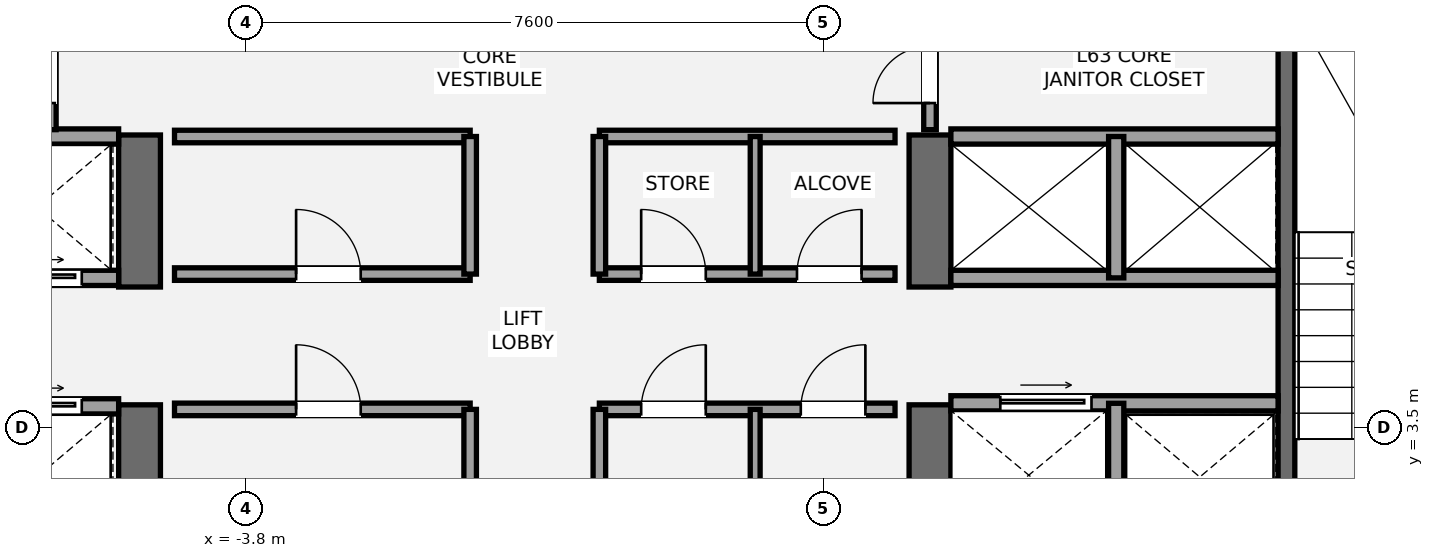
"""IFC4 building model, lengths in metres.
Left out: names, types, materials, properties, quantities, classifications, styles, units other than length and angle.
Written with IfcOpenShell. Run it as: python <this file> out.ifc"""

import sys

from ifc_helpers import new_model, si_unit, direction, frame, frame_2d, origin, place, context, subcontext, project, spatial, rectangle, extrude, element, fill, save


model = new_model("IFC4")
c1 = context("Model", 3, precision=1e-05, world=origin(), true_north=direction((0.0, 1.0)))
c2 = subcontext(c1, "Body", "Model", "MODEL_VIEW")
j1 = project(units=[si_unit("LENGTHUNIT", "METRE"), si_unit("PLANEANGLEUNIT", "RADIAN")], contexts=[c1])
p1 = place(None, origin())
s1 = spatial("IfcSite", under=j1, at=p1, CompositionType="ELEMENT")
p2 = place(p1, origin())
s2 = spatial("IfcBuilding", under=s1, at=p2, CompositionType="ELEMENT")
p3 = place(p2, frame((0.0, 0.0, 225.75)))
s3 = spatial("IfcBuildingStorey", under=s2, at=p3, CompositionType="ELEMENT", Elevation=225.75)
p4 = place(p3, frame((-5.2, 1.3, 0.0), z_axis=(0.0, 0.0, 1.0), x_axis=(0.0, 1.0, 0.0)))
e1 = element("IfcWall", 1, at=p4, inside=s3, PredefinedType="SHEAR", context=c2, shape_type="SweptSolid", body=[
    extrude(rectangle(XDim=2.5, YDim=0.55, at=frame_2d((1.25, 0.0))), origin(), (0.0, 0.0, 1.0), 3.15),
])
p5 = place(p3, frame((-5.2, 5.35, 0.0), z_axis=(0.0, 0.0, 1.0), x_axis=(0.0, 1.0, 0.0)))
e2 = element("IfcWall", 2, at=p5, inside=s3, PredefinedType="SHEAR", context=c2, shape_type="SweptSolid", body=[
    extrude(rectangle(XDim=2.0, YDim=0.55, at=frame_2d((1.0, 0.0))), origin(), (0.0, 0.0, 1.0), 3.15),
])
p6 = place(p3, frame((5.2, 1.3, 0.0), z_axis=(0.0, 0.0, 1.0), x_axis=(0.0, 1.0, 0.0)))
e3 = element("IfcWall", 3, at=p6, inside=s3, PredefinedType="SHEAR", context=c2, shape_type="SweptSolid", body=[
    extrude(rectangle(XDim=2.5, YDim=0.55, at=frame_2d((1.25, 0.0))), origin(), (0.0, 0.0, 1.0), 3.15),
])
p7 = place(p3, frame((5.2, 5.35, 0.0), z_axis=(0.0, 0.0, 1.0), x_axis=(0.0, 1.0, 0.0)))
e4 = element("IfcWall", 4, at=p7, inside=s3, PredefinedType="SHEAR", context=c2, shape_type="SweptSolid", body=[
    extrude(rectangle(XDim=2.0, YDim=0.55, at=frame_2d((1.0, 0.0))), origin(), (0.0, 0.0, 1.0), 3.15),
])
p8 = place(p3, frame((9.89, 1.85, 0.0), z_axis=(0.0, 0.0, 1.0), x_axis=(0.0, 1.0, 0.0)))
e5 = element("IfcWall", 5, at=p8, inside=s3, PredefinedType="SHEAR", context=c2, shape_type="SweptSolid", body=[
    extrude(rectangle(XDim=7.15, YDim=0.22, at=frame_2d((3.575, 0.0))), origin(), (0.0, 0.0, 1.0), 3.15),
])
p9 = place(p3, frame((-9.78, 3.78, 0.0), z_axis=(0.0, 0.0, 1.0), x_axis=(1.0, 0.0, 0.0)))
e6 = element("IfcWall", 6, at=p9, inside=s3, PredefinedType="SOLIDWALL", context=c2, shape_type="SweptSolid", body=[
    extrude(rectangle(XDim=4.305, YDim=0.2, at=frame_2d((2.152, 0.0))), origin(), (0.0, 0.0, 1.0), 2.97),
])
p10 = place(p9, frame((2.72, 0.0, 0.0)))
e7 = element("IfcOpeningElement", 7, at=p10, cuts=e6, PredefinedType="OPENING", context=c2, shape_type="SweptSolid", body=[
    extrude(rectangle(XDim=1.1, YDim=2.2, at=frame_2d((0.55, 1.1))), frame((0.0, 0.11, 0.0), z_axis=(0.0, -1.0, 0.0), x_axis=(1.0, 0.0, 0.0)), (0.0, 0.0, 1.0), 0.22),
])
p11 = place(p3, frame((-9.78, 5.47, 0.0), z_axis=(0.0, 0.0, 1.0), x_axis=(1.0, 0.0, 0.0)))
e8 = element("IfcWall", 8, at=p11, inside=s3, PredefinedType="SOLIDWALL", context=c2, shape_type="SweptSolid", body=[
    extrude(rectangle(XDim=4.305, YDim=0.2, at=frame_2d((2.152, 0.0))), origin(), (0.0, 0.0, 1.0), 2.97),
])
p12 = place(p11, frame((0.55, 0.0, 0.0)))
e9 = element("IfcOpeningElement", 9, at=p12, cuts=e8, PredefinedType="OPENING", context=c2, shape_type="SweptSolid", body=[
    extrude(rectangle(XDim=1.1, YDim=2.2, at=frame_2d((0.55, 1.1))), frame((0.0, 0.11, 0.0), z_axis=(0.0, -1.0, 0.0), x_axis=(1.0, 0.0, 0.0)), (0.0, 0.0, 1.0), 0.22),
])
p13 = place(p11, frame((2.72, 0.0, 0.0)))
e10 = element("IfcOpeningElement", 10, at=p13, cuts=e8, PredefinedType="OPENING", context=c2, shape_type="SweptSolid", body=[
    extrude(rectangle(XDim=1.1, YDim=2.2, at=frame_2d((0.55, 1.1))), frame((0.0, 0.11, 0.0), z_axis=(0.0, -1.0, 0.0), x_axis=(1.0, 0.0, 0.0)), (0.0, 0.0, 1.0), 0.22),
])
p14 = place(p3, frame((-9.78, 7.33, 0.0), z_axis=(0.0, 0.0, 1.0), x_axis=(1.0, 0.0, 0.0)))
e11 = element("IfcWall", 11, at=p14, inside=s3, PredefinedType="SOLIDWALL", context=c2, shape_type="SweptSolid", body=[
    extrude(rectangle(XDim=4.305, YDim=0.2, at=frame_2d((2.152, 0.0))), origin(), (0.0, 0.0, 1.0), 2.97),
])
p15 = place(p3, frame((5.475, 3.82, 0.0), z_axis=(0.0, 0.0, 1.0), x_axis=(1.0, 0.0, 0.0)))
e12 = element("IfcWall", 12, at=p15, inside=s3, PredefinedType="SOLIDWALL", context=c2, shape_type="SweptSolid", body=[
    extrude(rectangle(XDim=4.305, YDim=0.2, at=frame_2d((2.152, 0.0))), origin(), (0.0, 0.0, 1.0), 2.97),
])
p16 = place(p15, frame((0.65, 0.0, 0.0)))
e13 = element("IfcOpeningElement", 13, at=p16, cuts=e12, PredefinedType="OPENING", context=c2, shape_type="SweptSolid", body=[
    extrude(rectangle(XDim=1.2, YDim=2.2, at=frame_2d((0.6, 1.1))), frame((0.0, 0.11, 0.0), z_axis=(0.0, -1.0, 0.0), x_axis=(1.0, 0.0, 0.0)), (0.0, 0.0, 1.0), 0.22),
])
p17 = place(p3, frame((7.65, 1.85, 0.0), z_axis=(0.0, 0.0, 1.0), x_axis=(0.0, 1.0, 0.0)))
e14 = element("IfcWall", 14, at=p17, inside=s3, PredefinedType="SOLIDWALL", context=c2, shape_type="SweptSolid", body=[
    extrude(rectangle(XDim=1.97, YDim=0.2, at=frame_2d((0.985, 0.0))), origin(), (0.0, 0.0, 1.0), 2.97),
])
for number, where, z_axis, x_axis in (
    (15, (5.475, 5.47, 0.0), (0.0, 0.0, 1.0), (1.0, 0.0, 0.0)),
    (16, (5.475, 7.33, 0.0), (0.0, 0.0, 1.0), (1.0, 0.0, 0.0)),
):
    element("IfcWall", number, at=place(p3, frame(where, z_axis=z_axis, x_axis=x_axis)), inside=s3, PredefinedType="SOLIDWALL", context=c2, shape_type="SweptSolid", body=[
        extrude(rectangle(XDim=4.305, YDim=0.2, at=frame_2d((2.152, 0.0))), origin(), (0.0, 0.0, 1.0), 2.97),
    ])
p18 = place(p3, frame((7.65, 5.47, 0.0), z_axis=(0.0, 0.0, 1.0), x_axis=(0.0, 1.0, 0.0)))
e17 = element("IfcWall", 17, at=p18, inside=s3, PredefinedType="SOLIDWALL", context=c2, shape_type="SweptSolid", body=[
    extrude(rectangle(XDim=1.86, YDim=0.2, at=frame_2d((0.93, 0.0))), origin(), (0.0, 0.0, 1.0), 2.97),
])
p19 = place(p3, frame((-4.74, 3.74, 0.0), z_axis=(0.0, 0.0, 1.0), x_axis=(1.0, 0.0, 0.0)))
e18 = element("IfcWall", 18, at=p19, inside=s3, PredefinedType="PARTITIONING", context=c2, shape_type="SweptSolid", body=[
    extrude(rectangle(XDim=3.89, YDim=0.165, at=frame_2d((1.945, 0.0))), origin(), (0.0, 0.0, 1.0), 2.97),
])
p20 = place(p19, frame((1.6, 0.0, 0.0)))
e19 = element("IfcOpeningElement", 19, at=p20, cuts=e18, PredefinedType="OPENING", context=c2, shape_type="SweptSolid", body=[
    extrude(rectangle(XDim=0.85, YDim=2.1, at=frame_2d((0.425, 1.05))), frame((0.0, 0.093, 0.0), z_axis=(0.0, -1.0, 0.0), x_axis=(1.0, 0.0, 0.0)), (0.0, 0.0, 1.0), 0.185),
])
p21 = place(p3, frame((-0.85, 1.92, 0.0), z_axis=(0.0, 0.0, 1.0), x_axis=(0.0, 1.0, 0.0)))
e20 = element("IfcWall", 20, at=p21, inside=s3, PredefinedType="PARTITIONING", context=c2, shape_type="SweptSolid", body=[
    extrude(rectangle(XDim=1.82, YDim=0.165, at=frame_2d((0.91, 0.0))), origin(), (0.0, 0.0, 1.0), 2.97),
])
p22 = place(p3, frame((0.85, 3.74, 0.0), z_axis=(0.0, 0.0, 1.0), x_axis=(1.0, 0.0, 0.0)))
e21 = element("IfcWall", 21, at=p22, inside=s3, PredefinedType="PARTITIONING", context=c2, shape_type="SweptSolid", body=[
    extrude(rectangle(XDim=3.89, YDim=0.165, at=frame_2d((1.945, 0.0))), origin(), (0.0, 0.0, 1.0), 2.97),
])
p23 = place(p22, frame((0.55, 0.0, 0.0)))
e22 = element("IfcOpeningElement", 22, at=p23, cuts=e21, PredefinedType="OPENING", context=c2, shape_type="SweptSolid", body=[
    extrude(rectangle(XDim=0.85, YDim=2.1, at=frame_2d((0.425, 1.05))), frame((0.0, 0.093, 0.0), z_axis=(0.0, -1.0, 0.0), x_axis=(1.0, 0.0, 0.0)), (0.0, 0.0, 1.0), 0.185),
])
p24 = place(p22, frame((2.65, 0.0, 0.0)))
e23 = element("IfcOpeningElement", 23, at=p24, cuts=e21, PredefinedType="OPENING", context=c2, shape_type="SweptSolid", body=[
    extrude(rectangle(XDim=0.85, YDim=2.1, at=frame_2d((0.425, 1.05))), frame((0.0, 0.093, 0.0), z_axis=(0.0, -1.0, 0.0), x_axis=(1.0, 0.0, 0.0)), (0.0, 0.0, 1.0), 0.185),
])
p25 = place(p3, frame((0.85, 1.92, 0.0), z_axis=(0.0, 0.0, 1.0), x_axis=(0.0, 1.0, 0.0)))
e24 = element("IfcWall", 24, at=p25, inside=s3, PredefinedType="PARTITIONING", context=c2, shape_type="SweptSolid", body=[
    extrude(rectangle(XDim=1.82, YDim=0.165, at=frame_2d((0.91, 0.0))), origin(), (0.0, 0.0, 1.0), 2.97),
])
p26 = place(p3, frame((2.9, 1.92, 0.0), z_axis=(0.0, 0.0, 1.0), x_axis=(0.0, 1.0, 0.0)))
e25 = element("IfcWall", 25, at=p26, inside=s3, PredefinedType="PARTITIONING", context=c2, shape_type="SweptSolid", body=[
    extrude(rectangle(XDim=1.82, YDim=0.13, at=frame_2d((0.91, 0.0))), origin(), (0.0, 0.0, 1.0), 2.97),
])
p27 = place(p3, frame((-4.74, 5.52, 0.0), z_axis=(0.0, 0.0, 1.0), x_axis=(1.0, 0.0, 0.0)))
e26 = element("IfcWall", 26, at=p27, inside=s3, PredefinedType="PARTITIONING", context=c2, shape_type="SweptSolid", body=[
    extrude(rectangle(XDim=3.89, YDim=0.165, at=frame_2d((1.945, 0.0))), origin(), (0.0, 0.0, 1.0), 2.97),
])
p28 = place(p27, frame((1.6, 0.0, 0.0)))
e27 = element("IfcOpeningElement", 27, at=p28, cuts=e26, PredefinedType="OPENING", context=c2, shape_type="SweptSolid", body=[
    extrude(rectangle(XDim=0.85, YDim=2.1, at=frame_2d((0.425, 1.05))), frame((0.0, 0.093, 0.0), z_axis=(0.0, -1.0, 0.0), x_axis=(1.0, 0.0, 0.0)), (0.0, 0.0, 1.0), 0.185),
])
p29 = place(p3, frame((-4.74, 7.33, 0.0), z_axis=(0.0, 0.0, 1.0), x_axis=(1.0, 0.0, 0.0)))
e28 = element("IfcWall", 28, at=p29, inside=s3, PredefinedType="PARTITIONING", context=c2, shape_type="SweptSolid", body=[
    extrude(rectangle(XDim=3.89, YDim=0.165, at=frame_2d((1.945, 0.0))), origin(), (0.0, 0.0, 1.0), 2.97),
])
p30 = place(p3, frame((-0.85, 5.52, 0.0), z_axis=(0.0, 0.0, 1.0), x_axis=(0.0, 1.0, 0.0)))
e29 = element("IfcWall", 29, at=p30, inside=s3, PredefinedType="PARTITIONING", context=c2, shape_type="SweptSolid", body=[
    extrude(rectangle(XDim=1.81, YDim=0.165, at=frame_2d((0.905, 0.0))), origin(), (0.0, 0.0, 1.0), 2.97),
])
p31 = place(p3, frame((0.85, 5.52, 0.0), z_axis=(0.0, 0.0, 1.0), x_axis=(1.0, 0.0, 0.0)))
e30 = element("IfcWall", 30, at=p31, inside=s3, PredefinedType="PARTITIONING", context=c2, shape_type="SweptSolid", body=[
    extrude(rectangle(XDim=3.89, YDim=0.165, at=frame_2d((1.945, 0.0))), origin(), (0.0, 0.0, 1.0), 2.97),
])
p32 = place(p31, frame((0.55, 0.0, 0.0)))
e31 = element("IfcOpeningElement", 31, at=p32, cuts=e30, PredefinedType="OPENING", context=c2, shape_type="SweptSolid", body=[
    extrude(rectangle(XDim=0.85, YDim=2.1, at=frame_2d((0.425, 1.05))), frame((0.0, 0.093, 0.0), z_axis=(0.0, -1.0, 0.0), x_axis=(1.0, 0.0, 0.0)), (0.0, 0.0, 1.0), 0.185),
])
p33 = place(p31, frame((2.6, 0.0, 0.0)))
e32 = element("IfcOpeningElement", 32, at=p33, cuts=e30, PredefinedType="OPENING", context=c2, shape_type="SweptSolid", body=[
    extrude(rectangle(XDim=0.85, YDim=2.1, at=frame_2d((0.425, 1.05))), frame((0.0, 0.093, 0.0), z_axis=(0.0, -1.0, 0.0), x_axis=(1.0, 0.0, 0.0)), (0.0, 0.0, 1.0), 0.185),
])
p34 = place(p3, frame((0.85, 7.33, 0.0), z_axis=(0.0, 0.0, 1.0), x_axis=(1.0, 0.0, 0.0)))
e33 = element("IfcWall", 33, at=p34, inside=s3, PredefinedType="PARTITIONING", context=c2, shape_type="SweptSolid", body=[
    extrude(rectangle(XDim=3.89, YDim=0.165, at=frame_2d((1.945, 0.0))), origin(), (0.0, 0.0, 1.0), 2.97),
])
p35 = place(p3, frame((0.85, 5.52, 0.0), z_axis=(0.0, 0.0, 1.0), x_axis=(0.0, 1.0, 0.0)))
e34 = element("IfcWall", 34, at=p35, inside=s3, PredefinedType="PARTITIONING", context=c2, shape_type="SweptSolid", body=[
    extrude(rectangle(XDim=1.81, YDim=0.165, at=frame_2d((0.905, 0.0))), origin(), (0.0, 0.0, 1.0), 2.97),
])
p36 = place(p3, frame((2.9, 5.52, 0.0), z_axis=(0.0, 0.0, 1.0), x_axis=(0.0, 1.0, 0.0)))
e35 = element("IfcWall", 35, at=p36, inside=s3, PredefinedType="PARTITIONING", context=c2, shape_type="SweptSolid", body=[
    extrude(rectangle(XDim=1.81, YDim=0.13, at=frame_2d((0.905, 0.0))), origin(), (0.0, 0.0, 1.0), 2.97),
])
p37 = place(p3, frame((-6.38, 7.42, 0.0), z_axis=(0.0, 0.0, 1.0), x_axis=(0.0, 1.0, 0.0)))
e36 = element("IfcWall", 36, at=p37, inside=s3, PredefinedType="PARTITIONING", context=c2, shape_type="SweptSolid", body=[
    extrude(rectangle(XDim=1.58, YDim=0.165, at=frame_2d((0.79, 0.0))), origin(), (0.0, 0.0, 1.0), 2.97),
])
p38 = place(p37, frame((0.35, 0.0, 0.0)))
e37 = element("IfcOpeningElement", 37, at=p38, cuts=e36, PredefinedType="OPENING", context=c2, shape_type="SweptSolid", body=[
    extrude(rectangle(XDim=0.75, YDim=2.1, at=frame_2d((0.375, 1.05))), frame((0.0, 0.093, 0.0), z_axis=(0.0, -1.0, 0.0), x_axis=(1.0, 0.0, 0.0)), (0.0, 0.0, 1.0), 0.185),
])
p39 = place(p3, frame((5.2, 7.42, 0.0), z_axis=(0.0, 0.0, 1.0), x_axis=(0.0, 1.0, 0.0)))
e38 = element("IfcWall", 38, at=p39, inside=s3, PredefinedType="PARTITIONING", context=c2, shape_type="SweptSolid", body=[
    extrude(rectangle(XDim=1.58, YDim=0.165, at=frame_2d((0.79, 0.0))), origin(), (0.0, 0.0, 1.0), 2.97),
])
p40 = place(p39, frame((0.35, 0.0, 0.0)))
e39 = element("IfcOpeningElement", 39, at=p40, cuts=e38, PredefinedType="OPENING", context=c2, shape_type="SweptSolid", body=[
    extrude(rectangle(XDim=0.75, YDim=2.1, at=frame_2d((0.375, 1.05))), frame((0.0, 0.093, 0.0), z_axis=(0.0, -1.0, 0.0), x_axis=(1.0, 0.0, 0.0)), (0.0, 0.0, 1.0), 0.185),
])
p41 = place(p13, origin())
e40 = element("IfcDoor", 40, at=p41, inside=s3, OperationType="SLIDING_TO_LEFT", PredefinedType="DOOR", context=c2, shape_type="SweptSolid", body=[
    extrude(rectangle(XDim=1.1, YDim=2.2, at=frame_2d((0.55, 1.1))), frame((0.0, 0.025, 0.0), z_axis=(0.0, -1.0, 0.0), x_axis=(1.0, 0.0, 0.0)), (0.0, 0.0, 1.0), 0.05),
])
fill(e10, e40)
p42 = place(p10, origin())
e41 = element("IfcDoor", 41, at=p42, inside=s3, OperationType="SLIDING_TO_LEFT", PredefinedType="DOOR", context=c2, shape_type="SweptSolid", body=[
    extrude(rectangle(XDim=1.1, YDim=2.2, at=frame_2d((0.55, 1.1))), frame((0.0, 0.025, 0.0), z_axis=(0.0, -1.0, 0.0), x_axis=(1.0, 0.0, 0.0)), (0.0, 0.0, 1.0), 0.05),
])
fill(e7, e41)
p43 = place(p16, origin())
e42 = element("IfcDoor", 42, at=p43, inside=s3, OperationType="SLIDING_TO_RIGHT", PredefinedType="DOOR", context=c2, shape_type="SweptSolid", body=[
    extrude(rectangle(XDim=1.2, YDim=2.2, at=frame_2d((0.6, 1.1))), frame((0.0, 0.025, 0.0), z_axis=(0.0, -1.0, 0.0), x_axis=(1.0, 0.0, 0.0)), (0.0, 0.0, 1.0), 0.05),
])
fill(e13, e42)
p44 = place(p20, origin())
e43 = element("IfcDoor", 43, at=p44, inside=s3, OperationType="SINGLE_SWING_LEFT", PredefinedType="DOOR", context=c2, shape_type="SweptSolid", body=[
    extrude(rectangle(XDim=0.85, YDim=2.1, at=frame_2d((0.425, 1.05))), frame((0.0, 0.025, 0.0), z_axis=(0.0, -1.0, 0.0), x_axis=(1.0, 0.0, 0.0)), (0.0, 0.0, 1.0), 0.05),
])
fill(e19, e43)
p45 = place(p23, origin())
e44 = element("IfcDoor", 44, at=p45, inside=s3, OperationType="SINGLE_SWING_RIGHT", PredefinedType="DOOR", context=c2, shape_type="SweptSolid", body=[
    extrude(rectangle(XDim=0.85, YDim=2.1, at=frame_2d((0.425, 1.05))), frame((0.0, 0.025, 0.0), z_axis=(0.0, -1.0, 0.0), x_axis=(1.0, 0.0, 0.0)), (0.0, 0.0, 1.0), 0.05),
])
fill(e22, e44)
p46 = place(p24, origin())
e45 = element("IfcDoor", 45, at=p46, inside=s3, OperationType="SINGLE_SWING_RIGHT", PredefinedType="DOOR", context=c2, shape_type="SweptSolid", body=[
    extrude(rectangle(XDim=0.85, YDim=2.1, at=frame_2d((0.425, 1.05))), frame((0.0, 0.025, 0.0), z_axis=(0.0, -1.0, 0.0), x_axis=(1.0, 0.0, 0.0)), (0.0, 0.0, 1.0), 0.05),
])
fill(e23, e45)
p47 = place(p28, origin())
e46 = element("IfcDoor", 46, at=p47, inside=s3, OperationType="SINGLE_SWING_LEFT", PredefinedType="DOOR", context=c2, shape_type="SweptSolid", body=[
    extrude(rectangle(XDim=0.85, YDim=2.1, at=frame_2d((0.425, 1.05))), frame((0.0, 0.025, 0.0), z_axis=(0.0, -1.0, 0.0), x_axis=(1.0, 0.0, 0.0)), (0.0, 0.0, 1.0), 0.05),
])
fill(e27, e46)
p48 = place(p32, origin())
e47 = element("IfcDoor", 47, at=p48, inside=s3, OperationType="SINGLE_SWING_LEFT", PredefinedType="DOOR", context=c2, shape_type="SweptSolid", body=[
    extrude(rectangle(XDim=0.85, YDim=2.1, at=frame_2d((0.425, 1.05))), frame((0.0, 0.025, 0.0), z_axis=(0.0, -1.0, 0.0), x_axis=(1.0, 0.0, 0.0)), (0.0, 0.0, 1.0), 0.05),
])
fill(e31, e47)
p49 = place(p33, origin())
e48 = element("IfcDoor", 48, at=p49, inside=s3, OperationType="SINGLE_SWING_RIGHT", PredefinedType="DOOR", context=c2, shape_type="SweptSolid", body=[
    extrude(rectangle(XDim=0.85, YDim=2.1, at=frame_2d((0.425, 1.05))), frame((0.0, 0.025, 0.0), z_axis=(0.0, -1.0, 0.0), x_axis=(1.0, 0.0, 0.0)), (0.0, 0.0, 1.0), 0.05),
])
fill(e32, e48)
p50 = place(p40, origin())
e49 = element("IfcDoor", 49, at=p50, inside=s3, OperationType="SINGLE_SWING_LEFT", PredefinedType="DOOR", context=c2, shape_type="SweptSolid", body=[
    extrude(rectangle(XDim=0.75, YDim=2.1, at=frame_2d((0.375, 1.05))), frame((0.0, 0.025, 0.0), z_axis=(0.0, -1.0, 0.0), x_axis=(1.0, 0.0, 0.0)), (0.0, 0.0, 1.0), 0.05),
])
fill(e39, e49)
save(model, sys.argv[1])
